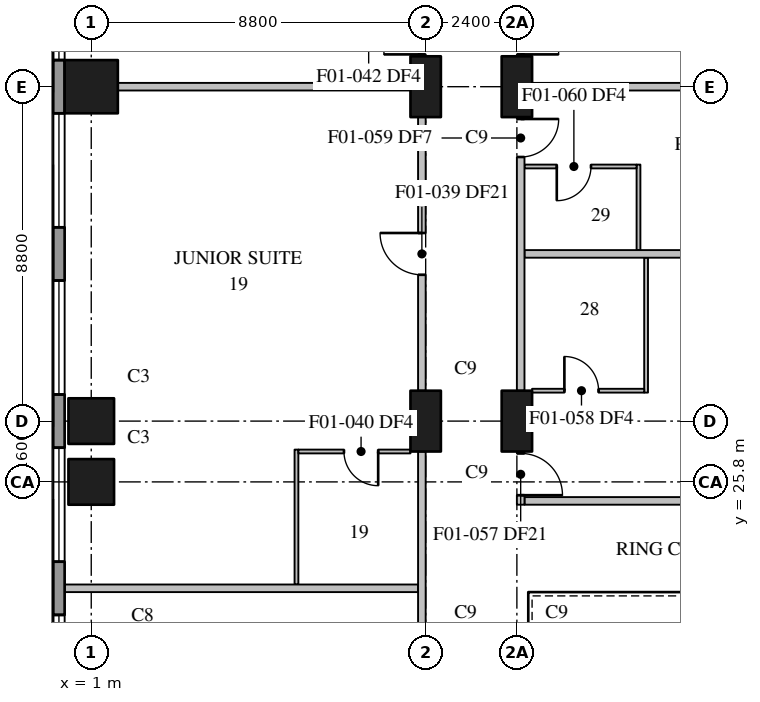
"""IFC4 building model, lengths in metres.
Left out: names, types, materials, properties, quantities, classifications, styles, units other than length and angle.
Written with IfcOpenShell. Run it as: python <this file> out.ifc"""

import sys

from ifc_helpers import new_model, si_unit, direction, frame, frame_2d, origin, origin_2d, place, context, subcontext, project, spatial, rectangle, extrude, element, fill, save


model = new_model("IFC4")
c1 = context("Model", 3, precision=1e-05, world=origin(), true_north=direction((0.0, 1.0)))
c2 = subcontext(c1, "Body", "Model", "MODEL_VIEW")
j1 = project(units=[si_unit("LENGTHUNIT", "METRE"), si_unit("PLANEANGLEUNIT", "RADIAN")], contexts=[c1])
p1 = place(None, origin())
s1 = spatial("IfcSite", under=j1, at=p1, CompositionType="ELEMENT")
p2 = place(p1, origin())
s2 = spatial("IfcBuilding", under=s1, at=p2, CompositionType="ELEMENT")
p3 = place(p2, frame((0.0, 0.0, 34.0)))
s3 = spatial("IfcBuildingStorey", under=s2, at=p3, CompositionType="ELEMENT", Elevation=34.0)
for number, where, z_axis, x_axis in (
    (1, (1.0, 25.8, 0.0), (0.0, 0.0, 1.0), (1.0, 0.0, 0.0)),
    (2, (1.0, 27.4, 0.0), (0.0, 0.0, 1.0), (1.0, 0.0, 0.0)),
):
    element("IfcColumn", number, at=place(p3, frame(where, z_axis=z_axis, x_axis=x_axis)), inside=s3, PredefinedType="COLUMN", context=c2, shape_type="SweptSolid", body=[
        extrude(rectangle(XDim=1.2, YDim=1.2, at=origin_2d()), origin(), (0.0, 0.0, 1.0), 3.7),
    ])
p4 = place(p3, frame((1.0, 36.2, 0.0), z_axis=(0.0, 0.0, 1.0), x_axis=(1.0, 0.0, 0.0)))
e3 = element("IfcColumn", 3, at=p4, inside=s3, PredefinedType="COLUMN", context=c2, shape_type="SweptSolid", body=[
    extrude(rectangle(XDim=1.4, YDim=1.4, at=origin_2d()), origin(), (0.0, 0.0, 1.0), 3.7),
])
for number, where, z_axis, x_axis in (
    (4, (9.8, 27.4, 0.0), (0.0, 0.0, 1.0), (0.0, 1.0, 0.0)),
    (5, (9.8, 36.2, 0.0), (0.0, 0.0, 1.0), (0.0, 1.0, 0.0)),
    (6, (12.2, 27.4, 0.0), (0.0, 0.0, 1.0), (0.0, 1.0, 0.0)),
    (7, (12.2, 36.2, 0.0), (0.0, 0.0, 1.0), (0.0, 1.0, 0.0)),
):
    element("IfcColumn", number, at=place(p3, frame(where, z_axis=z_axis, x_axis=x_axis)), inside=s3, PredefinedType="COLUMN", context=c2, shape_type="SweptSolid", body=[
        extrude(rectangle(XDim=1.6, YDim=0.8, at=origin_2d()), origin(), (0.0, 0.0, 1.0), 3.7),
    ])
p5 = place(p3, frame((0.15, 78.7, 0.0), z_axis=(0.0, 0.0, 1.0), x_axis=(0.0, -1.0, 0.0)))
e8 = element("IfcWall", 8, at=p5, inside=s3, PredefinedType="STANDARD", context=c2, shape_type="SweptSolid", body=[
    extrude(rectangle(XDim=76.5, YDim=0.3, at=frame_2d((38.25, 0.0))), origin(), (0.0, 0.0, 1.0), 3.4),
])
p6 = place(p5, frame((3.6, 0.0, 0.75)))
e9 = element("IfcOpeningElement", 9, at=p6, cuts=e8, PredefinedType="OPENING", context=c2, shape_type="SweptSolid", body=[
    extrude(rectangle(XDim=3.0, YDim=2.3, at=frame_2d((1.5, 1.15))), frame((0.0, 0.16, 0.0), z_axis=(0.0, -1.0, 0.0), x_axis=(1.0, 0.0, 0.0)), (0.0, 0.0, 1.0), 0.32),
])
p7 = place(p5, frame((8.0, 0.0, 0.75)))
e10 = element("IfcOpeningElement", 10, at=p7, cuts=e8, PredefinedType="OPENING", context=c2, shape_type="SweptSolid", body=[
    extrude(rectangle(XDim=3.0, YDim=2.3, at=frame_2d((1.5, 1.15))), frame((0.0, 0.16, 0.0), z_axis=(0.0, -1.0, 0.0), x_axis=(1.0, 0.0, 0.0)), (0.0, 0.0, 1.0), 0.32),
])
p8 = place(p5, frame((12.4, 0.0, 0.75)))
e11 = element("IfcOpeningElement", 11, at=p8, cuts=e8, PredefinedType="OPENING", context=c2, shape_type="SweptSolid", body=[
    extrude(rectangle(XDim=3.0, YDim=2.3, at=frame_2d((1.5, 1.15))), frame((0.0, 0.16, 0.0), z_axis=(0.0, -1.0, 0.0), x_axis=(1.0, 0.0, 0.0)), (0.0, 0.0, 1.0), 0.32),
])
p9 = place(p5, frame((16.8, 0.0, 0.75)))
e12 = element("IfcOpeningElement", 12, at=p9, cuts=e8, PredefinedType="OPENING", context=c2, shape_type="SweptSolid", body=[
    extrude(rectangle(XDim=3.0, YDim=2.3, at=frame_2d((1.5, 1.15))), frame((0.0, 0.16, 0.0), z_axis=(0.0, -1.0, 0.0), x_axis=(1.0, 0.0, 0.0)), (0.0, 0.0, 1.0), 0.32),
])
p10 = place(p5, frame((21.2, 0.0, 0.75)))
e13 = element("IfcOpeningElement", 13, at=p10, cuts=e8, PredefinedType="OPENING", context=c2, shape_type="SweptSolid", body=[
    extrude(rectangle(XDim=3.0, YDim=2.3, at=frame_2d((1.5, 1.15))), frame((0.0, 0.16, 0.0), z_axis=(0.0, -1.0, 0.0), x_axis=(1.0, 0.0, 0.0)), (0.0, 0.0, 1.0), 0.32),
])
p11 = place(p5, frame((25.6, 0.0, 0.75)))
e14 = element("IfcOpeningElement", 14, at=p11, cuts=e8, PredefinedType="OPENING", context=c2, shape_type="SweptSolid", body=[
    extrude(rectangle(XDim=3.0, YDim=2.3, at=frame_2d((1.5, 1.15))), frame((0.0, 0.16, 0.0), z_axis=(0.0, -1.0, 0.0), x_axis=(1.0, 0.0, 0.0)), (0.0, 0.0, 1.0), 0.32),
])
p12 = place(p5, frame((30.0, 0.0, 0.75)))
e15 = element("IfcOpeningElement", 15, at=p12, cuts=e8, PredefinedType="OPENING", context=c2, shape_type="SweptSolid", body=[
    extrude(rectangle(XDim=3.0, YDim=2.3, at=frame_2d((1.5, 1.15))), frame((0.0, 0.16, 0.0), z_axis=(0.0, -1.0, 0.0), x_axis=(1.0, 0.0, 0.0)), (0.0, 0.0, 1.0), 0.32),
])
p13 = place(p5, frame((34.4, 0.0, 0.75)))
e16 = element("IfcOpeningElement", 16, at=p13, cuts=e8, PredefinedType="OPENING", context=c2, shape_type="SweptSolid", body=[
    extrude(rectangle(XDim=3.0, YDim=2.3, at=frame_2d((1.5, 1.15))), frame((0.0, 0.16, 0.0), z_axis=(0.0, -1.0, 0.0), x_axis=(1.0, 0.0, 0.0)), (0.0, 0.0, 1.0), 0.32),
])
p14 = place(p5, frame((38.8, 0.0, 0.75)))
e17 = element("IfcOpeningElement", 17, at=p14, cuts=e8, PredefinedType="OPENING", context=c2, shape_type="SweptSolid", body=[
    extrude(rectangle(XDim=3.0, YDim=2.3, at=frame_2d((1.5, 1.15))), frame((0.0, 0.16, 0.0), z_axis=(0.0, -1.0, 0.0), x_axis=(1.0, 0.0, 0.0)), (0.0, 0.0, 1.0), 0.32),
])
p15 = place(p5, frame((43.2, 0.0, 0.75)))
e18 = element("IfcOpeningElement", 18, at=p15, cuts=e8, PredefinedType="OPENING", context=c2, shape_type="SweptSolid", body=[
    extrude(rectangle(XDim=3.0, YDim=2.3, at=frame_2d((1.5, 1.15))), frame((0.0, 0.16, 0.0), z_axis=(0.0, -1.0, 0.0), x_axis=(1.0, 0.0, 0.0)), (0.0, 0.0, 1.0), 0.32),
])
p16 = place(p5, frame((47.6, 0.0, 0.75)))
e19 = element("IfcOpeningElement", 19, at=p16, cuts=e8, PredefinedType="OPENING", context=c2, shape_type="SweptSolid", body=[
    extrude(rectangle(XDim=3.0, YDim=2.3, at=frame_2d((1.5, 1.15))), frame((0.0, 0.16, 0.0), z_axis=(0.0, -1.0, 0.0), x_axis=(1.0, 0.0, 0.0)), (0.0, 0.0, 1.0), 0.32),
])
p17 = place(p5, frame((52.0, 0.0, 0.75)))
e20 = element("IfcOpeningElement", 20, at=p17, cuts=e8, PredefinedType="OPENING", context=c2, shape_type="SweptSolid", body=[
    extrude(rectangle(XDim=3.0, YDim=2.3, at=frame_2d((1.5, 1.15))), frame((0.0, 0.16, 0.0), z_axis=(0.0, -1.0, 0.0), x_axis=(1.0, 0.0, 0.0)), (0.0, 0.0, 1.0), 0.32),
])
p18 = place(p5, frame((56.4, 0.0, 0.75)))
e21 = element("IfcOpeningElement", 21, at=p18, cuts=e8, PredefinedType="OPENING", context=c2, shape_type="SweptSolid", body=[
    extrude(rectangle(XDim=3.0, YDim=2.3, at=frame_2d((1.5, 1.15))), frame((0.0, 0.16, 0.0), z_axis=(0.0, -1.0, 0.0), x_axis=(1.0, 0.0, 0.0)), (0.0, 0.0, 1.0), 0.32),
])
p19 = place(p5, frame((60.8, 0.0, 0.75)))
e22 = element("IfcOpeningElement", 22, at=p19, cuts=e8, PredefinedType="OPENING", context=c2, shape_type="SweptSolid", body=[
    extrude(rectangle(XDim=3.0, YDim=2.3, at=frame_2d((1.5, 1.15))), frame((0.0, 0.16, 0.0), z_axis=(0.0, -1.0, 0.0), x_axis=(1.0, 0.0, 0.0)), (0.0, 0.0, 1.0), 0.32),
])
p20 = place(p5, frame((65.2, 0.0, 0.75)))
e23 = element("IfcOpeningElement", 23, at=p20, cuts=e8, PredefinedType="OPENING", context=c2, shape_type="SweptSolid", body=[
    extrude(rectangle(XDim=3.0, YDim=2.3, at=frame_2d((1.5, 1.15))), frame((0.0, 0.16, 0.0), z_axis=(0.0, -1.0, 0.0), x_axis=(1.0, 0.0, 0.0)), (0.0, 0.0, 1.0), 0.32),
])
p21 = place(p5, frame((69.6, 0.0, 0.75)))
e24 = element("IfcOpeningElement", 24, at=p21, cuts=e8, PredefinedType="OPENING", context=c2, shape_type="SweptSolid", body=[
    extrude(rectangle(XDim=3.0, YDim=2.3, at=frame_2d((1.5, 1.15))), frame((0.0, 0.16, 0.0), z_axis=(0.0, -1.0, 0.0), x_axis=(1.0, 0.0, 0.0)), (0.0, 0.0, 1.0), 0.32),
])
p22 = place(p3, frame((9.7, 21.8, 0.0), z_axis=(0.0, 0.0, 1.0), x_axis=(0.0, 1.0, 0.0)))
e25 = element("IfcWall", 25, at=p22, inside=s3, PredefinedType="PARTITIONING", context=c2, shape_type="SweptSolid", body=[
    extrude(rectangle(XDim=4.8, YDim=0.2, at=frame_2d((2.4, 0.0))), origin(), (0.0, 0.0, 1.0), 3.4),
])
p23 = place(p3, frame((9.7, 28.2, 0.0), z_axis=(0.0, 0.0, 1.0), x_axis=(0.0, 1.0, 0.0)))
e26 = element("IfcWall", 26, at=p23, inside=s3, PredefinedType="PARTITIONING", context=c2, shape_type="SweptSolid", body=[
    extrude(rectangle(XDim=7.2, YDim=0.2, at=frame_2d((3.6, 0.0))), origin(), (0.0, 0.0, 1.0), 3.4),
])
p24 = place(p23, frame((3.05, 0.0, 0.0)))
e27 = element("IfcOpeningElement", 27, at=p24, cuts=e26, PredefinedType="OPENING", context=c2, shape_type="SweptSolid", body=[
    extrude(rectangle(XDim=1.1, YDim=2.1, at=frame_2d((0.55, 1.05))), frame((0.0, 0.11, 0.0), z_axis=(0.0, -1.0, 0.0), x_axis=(1.0, 0.0, 0.0)), (0.0, 0.0, 1.0), 0.22),
])
p25 = place(p3, frame((9.7, 37.0, 0.0), z_axis=(0.0, 0.0, 1.0), x_axis=(0.0, 1.0, 0.0)))
e28 = element("IfcWall", 28, at=p25, inside=s3, PredefinedType="PARTITIONING", context=c2, shape_type="SweptSolid", body=[
    extrude(rectangle(XDim=7.2, YDim=0.2, at=frame_2d((3.6, 0.0))), origin(), (0.0, 0.0, 1.0), 3.4),
])
p26 = place(p25, frame((0.05, 0.0, 0.0)))
e29 = element("IfcOpeningElement", 29, at=p26, cuts=e28, PredefinedType="OPENING", context=c2, shape_type="SweptSolid", body=[
    extrude(rectangle(XDim=1.0, YDim=2.1, at=frame_2d((0.5, 1.05))), frame((0.0, 0.11, 0.0), z_axis=(0.0, -1.0, 0.0), x_axis=(1.0, 0.0, 0.0)), (0.0, 0.0, 1.0), 0.22),
])
p27 = place(p25, frame((6.25, 0.0, 0.0)))
e30 = element("IfcOpeningElement", 30, at=p27, cuts=e28, PredefinedType="OPENING", context=c2, shape_type="SweptSolid", body=[
    extrude(rectangle(XDim=0.9, YDim=2.1, at=frame_2d((0.45, 1.05))), frame((0.0, 0.11, 0.0), z_axis=(0.0, -1.0, 0.0), x_axis=(1.0, 0.0, 0.0)), (0.0, 0.0, 1.0), 0.22),
])
p28 = place(p25, frame((4.0, 0.0, 0.0)))
e31 = element("IfcOpeningElement", 31, at=p28, cuts=e28, PredefinedType="OPENING", context=c2, shape_type="SweptSolid", body=[
    extrude(rectangle(XDim=0.9, YDim=2.1, at=frame_2d((0.45, 1.05))), frame((0.0, 0.11, 0.0), z_axis=(0.0, -1.0, 0.0), x_axis=(1.0, 0.0, 0.0)), (0.0, 0.0, 1.0), 0.22),
])
p29 = place(p3, frame((0.31, 23.0, 0.0), z_axis=(0.0, 0.0, 1.0), x_axis=(1.0, 0.0, 0.0)))
e32 = element("IfcWall", 32, at=p29, inside=s3, PredefinedType="PARTITIONING", context=c2, shape_type="SweptSolid", body=[
    extrude(rectangle(XDim=9.29, YDim=0.2, at=frame_2d((4.645, 0.0))), origin(), (0.0, 0.0, 1.0), 3.4),
])
for number, where, z_axis, x_axis in (
    (33, (1.7, 36.2, 0.0), (0.0, 0.0, 1.0), (1.0, 0.0, 0.0)),
    (34, (12.6, 36.2, 0.0), (0.0, 0.0, 1.0), (1.0, 0.0, 0.0)),
):
    element("IfcWall", number, at=place(p3, frame(where, z_axis=z_axis, x_axis=x_axis)), inside=s3, PredefinedType="PARTITIONING", context=c2, shape_type="SweptSolid", body=[
        extrude(rectangle(XDim=7.7, YDim=0.2, at=frame_2d((3.85, 0.0))), origin(), (0.0, 0.0, 1.0), 3.4),
    ])
p30 = place(p3, frame((12.3, 26.6, 0.0), z_axis=(0.0, 0.0, 1.0), x_axis=(0.0, -1.0, 0.0)))
e35 = element("IfcWall", 35, at=p30, inside=s3, PredefinedType="PARTITIONING", context=c2, shape_type="SweptSolid", body=[
    extrude(rectangle(XDim=1.4, YDim=0.2, at=frame_2d((0.7, 0.0))), origin(), (0.0, 0.0, 1.0), 3.4),
])
p31 = place(p30, frame((0.05, 0.0, 0.0)))
e36 = element("IfcOpeningElement", 36, at=p31, cuts=e35, PredefinedType="OPENING", context=c2, shape_type="SweptSolid", body=[
    extrude(rectangle(XDim=1.1, YDim=2.1, at=frame_2d((0.55, 1.05))), frame((0.0, 0.11, 0.0), z_axis=(0.0, -1.0, 0.0), x_axis=(1.0, 0.0, 0.0)), (0.0, 0.0, 1.0), 0.22),
])
p32 = place(p3, frame((12.3, 35.4, 0.0), z_axis=(0.0, 0.0, 1.0), x_axis=(0.0, -1.0, 0.0)))
e37 = element("IfcWall", 37, at=p32, inside=s3, PredefinedType="PARTITIONING", context=c2, shape_type="SweptSolid", body=[
    extrude(rectangle(XDim=7.2, YDim=0.2, at=frame_2d((3.6, 0.0))), origin(), (0.0, 0.0, 1.0), 3.4),
])
p33 = place(p32, frame((0.05, 0.0, 0.0)))
e38 = element("IfcOpeningElement", 38, at=p33, cuts=e37, PredefinedType="OPENING", context=c2, shape_type="SweptSolid", body=[
    extrude(rectangle(XDim=1.0, YDim=2.1, at=frame_2d((0.5, 1.05))), frame((0.0, 0.11, 0.0), z_axis=(0.0, -1.0, 0.0), x_axis=(1.0, 0.0, 0.0)), (0.0, 0.0, 1.0), 0.22),
])
p34 = place(p3, frame((12.3, 44.2, 0.0), z_axis=(0.0, 0.0, 1.0), x_axis=(0.0, -1.0, 0.0)))
e39 = element("IfcWall", 39, at=p34, inside=s3, PredefinedType="PARTITIONING", context=c2, shape_type="SweptSolid", body=[
    extrude(rectangle(XDim=7.2, YDim=0.2, at=frame_2d((3.6, 0.0))), origin(), (0.0, 0.0, 1.0), 3.4),
])
p35 = place(p34, frame((6.15, 0.0, 0.0)))
e40 = element("IfcOpeningElement", 40, at=p35, cuts=e39, PredefinedType="OPENING", context=c2, shape_type="SweptSolid", body=[
    extrude(rectangle(XDim=1.0, YDim=2.1, at=frame_2d((0.5, 1.05))), frame((0.0, 0.11, 0.0), z_axis=(0.0, -1.0, 0.0), x_axis=(1.0, 0.0, 0.0)), (0.0, 0.0, 1.0), 0.22),
])
p36 = place(p34, frame((0.05, 0.0, 0.0)))
e41 = element("IfcOpeningElement", 41, at=p36, cuts=e39, PredefinedType="OPENING", context=c2, shape_type="SweptSolid", body=[
    extrude(rectangle(XDim=1.0, YDim=2.1, at=frame_2d((0.5, 1.05))), frame((0.0, 0.11, 0.0), z_axis=(0.0, -1.0, 0.0), x_axis=(1.0, 0.0, 0.0)), (0.0, 0.0, 1.0), 0.22),
])
p37 = place(p3, frame((12.4, 25.3, 0.0), z_axis=(0.0, 0.0, 1.0), x_axis=(1.0, 0.0, 0.0)))
e42 = element("IfcWall", 42, at=p37, inside=s3, PredefinedType="PARTITIONING", context=c2, shape_type="SweptSolid", body=[
    extrude(rectangle(XDim=8.0, YDim=0.2, at=frame_2d((4.0, 0.0))), origin(), (0.0, 0.0, 1.0), 3.4),
])
p38 = place(p3, frame((12.4, 31.8, 0.0), z_axis=(0.0, 0.0, 1.0), x_axis=(1.0, 0.0, 0.0)))
e43 = element("IfcWall", 43, at=p38, inside=s3, PredefinedType="PARTITIONING", context=c2, shape_type="SweptSolid", body=[
    extrude(rectangle(XDim=14.2, YDim=0.2, at=frame_2d((7.1, 0.0))), origin(), (0.0, 0.0, 1.0), 3.4),
])
p39 = place(p3, frame((6.4, 23.1, 0.0), z_axis=(0.0, 0.0, 1.0), x_axis=(0.0, 1.0, 0.0)))
e44 = element("IfcWall", 44, at=p39, inside=s3, PredefinedType="PARTITIONING", context=c2, shape_type="SweptSolid", body=[
    extrude(rectangle(XDim=3.55, YDim=0.1, at=frame_2d((1.775, 0.0))), origin(), (0.0, 0.0, 1.0), 3.4),
])
p40 = place(p3, frame((9.4, 26.6, 0.0), z_axis=(0.0, 0.0, 1.0), x_axis=(-1.0, 0.0, 0.0)))
e45 = element("IfcWall", 45, at=p40, inside=s3, PredefinedType="PARTITIONING", context=c2, shape_type="SweptSolid", body=[
    extrude(rectangle(XDim=2.95, YDim=0.1, at=frame_2d((1.475, 0.0))), origin(), (0.0, 0.0, 1.0), 3.4),
])
p41 = place(p40, frame((0.85, 0.0, 0.0)))
e46 = element("IfcOpeningElement", 46, at=p41, cuts=e45, PredefinedType="OPENING", context=c2, shape_type="SweptSolid", body=[
    extrude(rectangle(XDim=0.9, YDim=2.1, at=frame_2d((0.45, 1.05))), frame((0.0, 0.06, 0.0), z_axis=(0.0, -1.0, 0.0), x_axis=(1.0, 0.0, 0.0)), (0.0, 0.0, 1.0), 0.12),
])
p42 = place(p3, frame((15.6, 28.15, 0.0), z_axis=(0.0, 0.0, 1.0), x_axis=(0.0, 1.0, 0.0)))
e47 = element("IfcWall", 47, at=p42, inside=s3, PredefinedType="PARTITIONING", context=c2, shape_type="SweptSolid", body=[
    extrude(rectangle(XDim=3.55, YDim=0.1, at=frame_2d((1.775, 0.0))), origin(), (0.0, 0.0, 1.0), 3.4),
])
p43 = place(p3, frame((12.6, 28.2, 0.0), z_axis=(0.0, 0.0, 1.0), x_axis=(1.0, 0.0, 0.0)))
e48 = element("IfcWall", 48, at=p43, inside=s3, PredefinedType="PARTITIONING", context=c2, shape_type="SweptSolid", body=[
    extrude(rectangle(XDim=2.95, YDim=0.1, at=frame_2d((1.475, 0.0))), origin(), (0.0, 0.0, 1.0), 3.4),
])
p44 = place(p43, frame((0.85, 0.0, 0.0)))
e49 = element("IfcOpeningElement", 49, at=p44, cuts=e48, PredefinedType="OPENING", context=c2, shape_type="SweptSolid", body=[
    extrude(rectangle(XDim=0.9, YDim=2.1, at=frame_2d((0.45, 1.05))), frame((0.0, 0.06, 0.0), z_axis=(0.0, -1.0, 0.0), x_axis=(1.0, 0.0, 0.0)), (0.0, 0.0, 1.0), 0.12),
])
p45 = place(p3, frame((15.4, 31.9, 0.0), z_axis=(0.0, 0.0, 1.0), x_axis=(0.0, 1.0, 0.0)))
e50 = element("IfcWall", 50, at=p45, inside=s3, PredefinedType="PARTITIONING", context=c2, shape_type="SweptSolid", body=[
    extrude(rectangle(XDim=2.25, YDim=0.1, at=frame_2d((1.125, 0.0))), origin(), (0.0, 0.0, 1.0), 3.4),
])
p46 = place(p3, frame((15.35, 34.1, 0.0), z_axis=(0.0, 0.0, 1.0), x_axis=(-1.0, 0.0, 0.0)))
e51 = element("IfcWall", 51, at=p46, inside=s3, PredefinedType="PARTITIONING", context=c2, shape_type="SweptSolid", body=[
    extrude(rectangle(XDim=2.95, YDim=0.1, at=frame_2d((1.475, 0.0))), origin(), (0.0, 0.0, 1.0), 3.4),
])
p47 = place(p46, frame((1.2, 0.0, 0.0)))
e52 = element("IfcOpeningElement", 52, at=p47, cuts=e51, PredefinedType="OPENING", context=c2, shape_type="SweptSolid", body=[
    extrude(rectangle(XDim=0.9, YDim=2.1, at=frame_2d((0.45, 1.05))), frame((0.0, 0.06, 0.0), z_axis=(0.0, -1.0, 0.0), x_axis=(1.0, 0.0, 0.0)), (0.0, 0.0, 1.0), 0.12),
])
p48 = place(p14, origin())
e53 = element("IfcWindow", 53, at=p48, inside=s3, PartitioningType="SINGLE_PANEL", PredefinedType="WINDOW", context=c2, shape_type="SweptSolid", body=[
    extrude(rectangle(XDim=3.0, YDim=2.3, at=frame_2d((1.5, 1.15))), frame((0.0, 0.03, 0.0), z_axis=(0.0, -1.0, 0.0), x_axis=(1.0, 0.0, 0.0)), (0.0, 0.0, 1.0), 0.06),
])
fill(e17, e53)
p49 = place(p15, origin())
e54 = element("IfcWindow", 54, at=p49, inside=s3, PartitioningType="SINGLE_PANEL", PredefinedType="WINDOW", context=c2, shape_type="SweptSolid", body=[
    extrude(rectangle(XDim=3.0, YDim=2.3, at=frame_2d((1.5, 1.15))), frame((0.0, 0.03, 0.0), z_axis=(0.0, -1.0, 0.0), x_axis=(1.0, 0.0, 0.0)), (0.0, 0.0, 1.0), 0.06),
])
fill(e18, e54)
p50 = place(p16, origin())
e55 = element("IfcWindow", 55, at=p50, inside=s3, PartitioningType="SINGLE_PANEL", PredefinedType="WINDOW", context=c2, shape_type="SweptSolid", body=[
    extrude(rectangle(XDim=3.0, YDim=2.3, at=frame_2d((1.5, 1.15))), frame((0.0, 0.03, 0.0), z_axis=(0.0, -1.0, 0.0), x_axis=(1.0, 0.0, 0.0)), (0.0, 0.0, 1.0), 0.06),
])
fill(e19, e55)
p51 = place(p17, origin())
e56 = element("IfcWindow", 56, at=p51, inside=s3, PartitioningType="SINGLE_PANEL", PredefinedType="WINDOW", context=c2, shape_type="SweptSolid", body=[
    extrude(rectangle(XDim=3.0, YDim=2.3, at=frame_2d((1.5, 1.15))), frame((0.0, 0.03, 0.0), z_axis=(0.0, -1.0, 0.0), x_axis=(1.0, 0.0, 0.0)), (0.0, 0.0, 1.0), 0.06),
])
fill(e20, e56)
p52 = place(p18, origin())
e57 = element("IfcWindow", 57, at=p52, inside=s3, PartitioningType="SINGLE_PANEL", PredefinedType="WINDOW", context=c2, shape_type="SweptSolid", body=[
    extrude(rectangle(XDim=3.0, YDim=2.3, at=frame_2d((1.5, 1.15))), frame((0.0, 0.03, 0.0), z_axis=(0.0, -1.0, 0.0), x_axis=(1.0, 0.0, 0.0)), (0.0, 0.0, 1.0), 0.06),
])
fill(e21, e57)
p53 = place(p24, origin())
e58 = element("IfcDoor", 58, at=p53, inside=s3, OperationType="SINGLE_SWING_RIGHT", PredefinedType="DOOR", context=c2, shape_type="SweptSolid", body=[
    extrude(rectangle(XDim=1.1, YDim=2.1, at=frame_2d((0.55, 1.05))), frame((0.0, 0.025, 0.0), z_axis=(0.0, -1.0, 0.0), x_axis=(1.0, 0.0, 0.0)), (0.0, 0.0, 1.0), 0.05),
])
fill(e27, e58)
p54 = place(p41, origin())
e59 = element("IfcDoor", 59, at=p54, inside=s3, OperationType="SINGLE_SWING_LEFT", PredefinedType="DOOR", context=c2, shape_type="SweptSolid", body=[
    extrude(rectangle(XDim=0.9, YDim=2.1, at=frame_2d((0.45, 1.05))), frame((0.0, 0.025, 0.0), z_axis=(0.0, -1.0, 0.0), x_axis=(1.0, 0.0, 0.0)), (0.0, 0.0, 1.0), 0.05),
])
fill(e46, e59)
p55 = place(p26, origin())
e60 = element("IfcDoor", 60, at=p55, inside=s3, OperationType="SINGLE_SWING_LEFT", PredefinedType="DOOR", context=c2, shape_type="SweptSolid", body=[
    extrude(rectangle(XDim=1.0, YDim=2.1, at=frame_2d((0.5, 1.05))), frame((0.0, 0.025, 0.0), z_axis=(0.0, -1.0, 0.0), x_axis=(1.0, 0.0, 0.0)), (0.0, 0.0, 1.0), 0.05),
])
fill(e29, e60)
p56 = place(p31, origin())
e61 = element("IfcDoor", 61, at=p56, inside=s3, OperationType="SINGLE_SWING_RIGHT", PredefinedType="DOOR", context=c2, shape_type="SweptSolid", body=[
    extrude(rectangle(XDim=1.1, YDim=2.1, at=frame_2d((0.55, 1.05))), frame((0.0, 0.025, 0.0), z_axis=(0.0, -1.0, 0.0), x_axis=(1.0, 0.0, 0.0)), (0.0, 0.0, 1.0), 0.05),
])
fill(e36, e61)
p57 = place(p44, origin())
e62 = element("IfcDoor", 62, at=p57, inside=s3, OperationType="SINGLE_SWING_LEFT", PredefinedType="DOOR", context=c2, shape_type="SweptSolid", body=[
    extrude(rectangle(XDim=0.9, YDim=2.1, at=frame_2d((0.45, 1.05))), frame((0.0, 0.025, 0.0), z_axis=(0.0, -1.0, 0.0), x_axis=(1.0, 0.0, 0.0)), (0.0, 0.0, 1.0), 0.05),
])
fill(e49, e62)
p58 = place(p33, origin())
e63 = element("IfcDoor", 63, at=p58, inside=s3, OperationType="SINGLE_SWING_LEFT", PredefinedType="DOOR", context=c2, shape_type="SweptSolid", body=[
    extrude(rectangle(XDim=1.0, YDim=2.1, at=frame_2d((0.5, 1.05))), frame((0.0, 0.025, 0.0), z_axis=(0.0, -1.0, 0.0), x_axis=(1.0, 0.0, 0.0)), (0.0, 0.0, 1.0), 0.05),
])
fill(e38, e63)
p59 = place(p47, origin())
e64 = element("IfcDoor", 64, at=p59, inside=s3, OperationType="SINGLE_SWING_RIGHT", PredefinedType="DOOR", context=c2, shape_type="SweptSolid", body=[
    extrude(rectangle(XDim=0.9, YDim=2.1, at=frame_2d((0.45, 1.05))), frame((0.0, 0.025, 0.0), z_axis=(0.0, -1.0, 0.0), x_axis=(1.0, 0.0, 0.0)), (0.0, 0.0, 1.0), 0.05),
])
fill(e52, e64)
p60 = place(p35, origin())
e65 = element("IfcDoor", 65, at=p60, inside=s3, OperationType="SINGLE_SWING_RIGHT", PredefinedType="DOOR", context=c2, shape_type="SweptSolid", body=[
    extrude(rectangle(XDim=1.0, YDim=2.1, at=frame_2d((0.5, 1.05))), frame((0.0, 0.025, 0.0), z_axis=(0.0, -1.0, 0.0), x_axis=(1.0, 0.0, 0.0)), (0.0, 0.0, 1.0), 0.05),
])
fill(e40, e65)
save(model, sys.argv[1])
